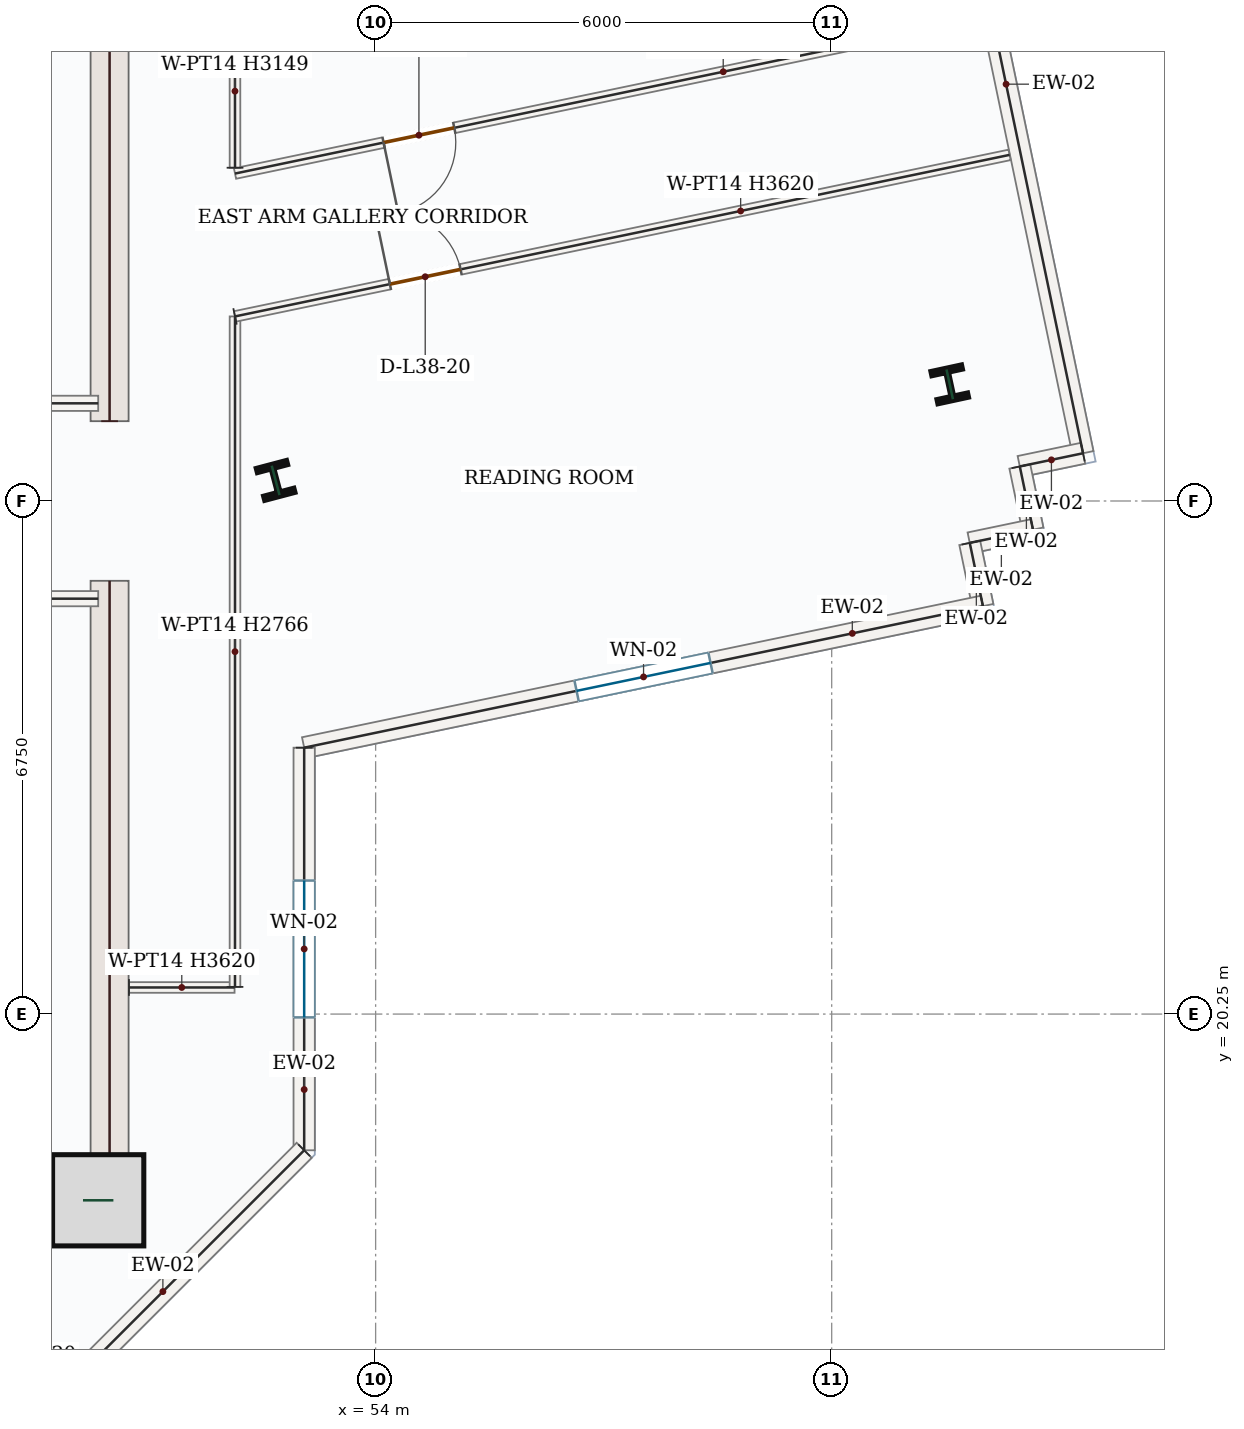
"""IFC4 building model, lengths in metres.
Left out: names, types, materials, properties, quantities, classifications, styles, units other than length and angle.
Written with IfcOpenShell. Run it as: python <this file> out.ifc"""

import sys

from ifc_helpers import new_model, si_unit, direction, frame, frame_2d, origin, origin_2d, place, context, subcontext, project, spatial, rectangle, i_section, extrude, source, transform, mapped, element, fill, save


model = new_model("IFC4")
c1 = context("Model", 3, precision=1e-05, world=origin(), true_north=direction((0.0, 1.0)))
c2 = subcontext(c1, "Body", "Model", "MODEL_VIEW")
j1 = project(units=[si_unit("LENGTHUNIT", "METRE"), si_unit("PLANEANGLEUNIT", "RADIAN")], contexts=[c1])
p1 = place(None, origin())
s1 = spatial("IfcSite", under=j1, at=p1, CompositionType="ELEMENT")
p2 = place(p1, origin())
s2 = spatial("IfcBuilding", under=s1, at=p2, CompositionType="ELEMENT")
p3 = place(p2, frame((0.0, 0.0, 166.8)))
s3 = spatial("IfcBuildingStorey", under=s2, at=p3, CompositionType="ELEMENT", Elevation=166.8)
m1 = source(origin(), c2, "Body", "SweptSolid", [
    extrude(rectangle(XDim=8.55, YDim=0.5, at=frame_2d((4.275, 0.0))), origin(), (0.0, 0.0, 1.0), 3.62),
])
for number, where, z_axis, x_axis in (
    (1, (50.5, 17.4, 0.0), (0.0, 0.0, 1.0), (0.0, 1.0, 0.0)),
    (2, (50.5, 28.05, 0.0), (0.0, 0.0, 1.0), (0.0, 1.0, 0.0)),
):
    element("IfcWall", number, at=place(p3, frame(where, z_axis=z_axis, x_axis=x_axis)), inside=s3, PredefinedType="SHEAR", context=c2, shape_type="MappedRepresentation", body=[
        mapped(m1, transform((0.0, 0.0, 0.0), x_axis=(1.0, 0.0, 0.0), y_axis=(0.0, 1.0, 0.0), z_axis=(0.0, 0.0, 1.0), scale=1.0)),
    ])
m2 = source(origin(), c2, "Body", "SweptSolid", [
    extrude(rectangle(XDim=7.0, YDim=0.5, at=frame_2d((3.5, 0.0))), origin(), (0.0, 0.0, 1.0), 3.62),
])
p4 = place(p3, frame((43.25, 17.65, 0.0), z_axis=(0.0, 0.0, 1.0), x_axis=(1.0, 0.0, 0.0)))
e3 = element("IfcWall", 3, at=p4, inside=s3, PredefinedType="SHEAR", context=c2, shape_type="MappedRepresentation", body=[
    mapped(m2, transform((0.0, 0.0, 0.0), x_axis=(1.0, 0.0, 0.0), y_axis=(0.0, 1.0, 0.0), z_axis=(0.0, 0.0, 1.0), scale=1.0)),
])
m3 = source(origin(), c2, "Body", "SweptSolid", [
    extrude(rectangle(XDim=1.2, YDim=1.2, at=origin_2d()), origin(), (0.0, 0.0, 1.0), 3.9),
])
p5 = place(p3, frame((50.35, 17.8, 0.0), z_axis=(0.0, 0.0, 1.0), x_axis=(1.0, 0.0, 0.0)))
e4 = element("IfcColumn", 4, at=p5, inside=s3, PredefinedType="COLUMN", context=c2, shape_type="MappedRepresentation", body=[
    mapped(m3, transform((0.0, 0.0, 0.0), x_axis=(1.0, 0.0, 0.0), y_axis=(0.0, 1.0, 0.0), z_axis=(0.0, 0.0, 1.0), scale=1.0)),
])
m4 = source(origin(), c2, "Body", "SweptSolid", [
    extrude(i_section(OverallWidth=0.412, OverallDepth=0.435, WebThickness=0.036, FlangeThickness=0.057, FilletRadius=0.018, at=origin_2d()), origin(), (0.0, 0.0, 1.0), 3.9),
])
for number, where, z_axis, x_axis in (
    (5, (52.684, 27.271, 0.0), (0.0, 0.0, 1.0), (0.967, 0.255, 0.0)),
    (6, (61.553, 28.535, 0.0), (0.0, 0.0, 1.0), (0.977, 0.211, 0.0)),
):
    element("IfcColumn", number, at=place(p3, frame(where, z_axis=z_axis, x_axis=x_axis)), inside=s3, PredefinedType="COLUMN", context=c2, shape_type="MappedRepresentation", body=[
        mapped(m4, transform((0.0, 0.0, 0.0), x_axis=(1.0, 0.0, 0.0), y_axis=(0.0, 1.0, 0.0), z_axis=(0.0, 0.0, 1.0), scale=1.0)),
    ])
m5 = source(origin(), c2, "Body", "SweptSolid", [
    extrude(rectangle(XDim=9.92, YDim=0.28, at=frame_2d((4.96, 0.0))), origin(), (0.0, 0.0, 1.0), 3.62),
])
p6 = place(p3, frame((61.282, 37.339, 0.0), z_axis=(0.0, 0.0, 1.0), x_axis=(0.204150812873, -0.978939449406, 0.0)))
e7 = element("IfcWall", 7, at=p6, inside=s3, PredefinedType="SOLIDWALL", context=c2, shape_type="MappedRepresentation", body=[
    mapped(m5, transform((0.0, 0.0, 0.0), x_axis=(1.0, 0.0, 0.0), y_axis=(0.0, 1.0, 0.0), z_axis=(0.0, 0.0, 1.0), scale=1.0)),
])
m6 = source(origin(), c2, "Body", "SweptSolid", [
    extrude(rectangle(XDim=0.85, YDim=0.28, at=frame_2d((0.425, 0.0))), origin(), (0.0, 0.0, 1.0), 3.62),
])
for number, where, z_axis, x_axis in (
    (8, (63.307, 27.628, 0.0), (0.0, 0.0, 1.0), (-0.979, -0.204, 0.0)),
    (9, (62.475, 27.455, 0.0), (0.0, 0.0, 1.0), (0.204, -0.979, 0.0)),
    (10, (62.648, 26.623, 0.0), (0.0, 0.0, 1.0), (-0.979, -0.204, 0.0)),
):
    element("IfcWall", number, at=place(p3, frame(where, z_axis=z_axis, x_axis=x_axis)), inside=s3, PredefinedType="SOLIDWALL", context=c2, shape_type="MappedRepresentation", body=[
        mapped(m6, transform((0.0, 0.0, 0.0), x_axis=(1.0, 0.0, 0.0), y_axis=(0.0, 1.0, 0.0), z_axis=(0.0, 0.0, 1.0), scale=1.0)),
    ])
m7 = source(origin(), c2, "Body", "SweptSolid", [
    extrude(rectangle(XDim=0.85, YDim=0.28, at=frame_2d((0.425, 0.0))), origin(), (0.0, 0.0, 1.0), 3.62),
])
p7 = place(p3, frame((61.816, 26.449, 0.0), z_axis=(0.0, 0.0, 1.0), x_axis=(0.203896913579, -0.97899236393, 0.0)))
e11 = element("IfcWall", 11, at=p7, inside=s3, PredefinedType="SOLIDWALL", context=c2, shape_type="MappedRepresentation", body=[
    mapped(m7, transform((0.0, 0.0, 0.0), x_axis=(1.0, 0.0, 0.0), y_axis=(0.0, 1.0, 0.0), z_axis=(0.0, 0.0, 1.0), scale=1.0)),
])
p8 = place(p3, frame((61.99, 25.617, 0.0), z_axis=(0.0, 0.0, 1.0), x_axis=(-0.978937646314, -0.204159458828, 0.0)))
e12 = element("IfcWall", 12, at=p8, inside=s3, PredefinedType="SOLIDWALL", context=c2, shape_type="SweptSolid", body=[
    extrude(rectangle(XDim=9.122, YDim=0.28, at=frame_2d((4.561, 0.0))), origin(), (0.0, 0.0, 1.0), 3.62),
])
p9 = place(p8, frame((3.661, 0.0, 0.85)))
e13 = element("IfcOpeningElement", 13, at=p9, cuts=e12, PredefinedType="OPENING", context=c2, shape_type="SweptSolid", body=[
    extrude(rectangle(XDim=1.8, YDim=1.75, at=frame_2d((0.9, 0.875))), frame((0.0, 0.15, 0.0), z_axis=(0.0, -1.0, 0.0), x_axis=(1.0, 0.0, 0.0)), (0.0, 0.0, 1.0), 0.3),
])
p10 = place(p3, frame((53.06, 23.754, 0.0), z_axis=(0.0, 0.0, 1.0), x_axis=(0.0, -1.0, 0.0)))
e14 = element("IfcWall", 14, at=p10, inside=s3, PredefinedType="SOLIDWALL", context=c2, shape_type="SweptSolid", body=[
    extrude(rectangle(XDim=5.296, YDim=0.28, at=frame_2d((2.648, 0.0))), origin(), (0.0, 0.0, 1.0), 3.62),
])
p11 = place(p10, frame((1.748, 0.0, 0.85)))
e15 = element("IfcOpeningElement", 15, at=p11, cuts=e14, PredefinedType="OPENING", context=c2, shape_type="SweptSolid", body=[
    extrude(rectangle(XDim=1.8, YDim=1.75, at=frame_2d((0.9, 0.875))), frame((0.0, 0.15, 0.0), z_axis=(0.0, -1.0, 0.0), x_axis=(1.0, 0.0, 0.0)), (0.0, 0.0, 1.0), 0.3),
])
m8 = source(origin(), c2, "Body", "SweptSolid", [
    extrude(rectangle(XDim=5.258, YDim=0.28, at=frame_2d((2.629, 0.0))), origin(), (0.0, 0.0, 1.0), 3.62),
])
p12 = place(p3, frame((53.06, 18.458, 0.0), z_axis=(0.0, 0.0, 1.0), x_axis=(-0.707106781187, -0.707106781187, 0.0)))
e16 = element("IfcWall", 16, at=p12, inside=s3, PredefinedType="SOLIDWALL", context=c2, shape_type="MappedRepresentation", body=[
    mapped(m8, transform((0.0, 0.0, 0.0), x_axis=(1.0, 0.0, 0.0), y_axis=(0.0, 1.0, 0.0), z_axis=(0.0, 0.0, 1.0), scale=1.0)),
])
m9 = source(origin(), c2, "Body", "SweptSolid", [
    extrude(rectangle(XDim=4.25, YDim=0.2, at=frame_2d((2.125, 0.0))), origin(), (0.0, 0.0, 1.0), 3.62),
])
for number, where, z_axis, x_axis in (
    (17, (46.1, 25.715, 0.0), (0.0, 0.0, 1.0), (1.0, 0.0, 0.0)),
    (18, (46.1, 28.285, 0.0), (0.0, 0.0, 1.0), (1.0, 0.0, 0.0)),
):
    element("IfcWall", number, at=place(p3, frame(where, z_axis=z_axis, x_axis=x_axis)), inside=s3, PredefinedType="SOLIDWALL", context=c2, shape_type="MappedRepresentation", body=[
        mapped(m9, transform((0.0, 0.0, 0.0), x_axis=(1.0, 0.0, 0.0), y_axis=(0.0, 1.0, 0.0), z_axis=(0.0, 0.0, 1.0), scale=1.0)),
    ])
m10 = source(origin(), c2, "Body", "SweptSolid", [
    extrude(rectangle(XDim=1.389, YDim=0.14, at=frame_2d((0.695, 0.0))), origin(), (0.0, 0.0, 1.0), 3.62),
])
p13 = place(p3, frame((50.755, 20.6, 0.0), z_axis=(0.0, 0.0, 1.0), x_axis=(1.0, 0.0, 0.0)))
e19 = element("IfcWall", 19, at=p13, inside=s3, PredefinedType="PARTITIONING", context=c2, shape_type="MappedRepresentation", body=[
    mapped(m10, transform((0.0, 0.0, 0.0), x_axis=(1.0, 0.0, 0.0), y_axis=(0.0, 1.0, 0.0), z_axis=(0.0, 0.0, 1.0), scale=1.0)),
])
m11 = source(origin(), c2, "Body", "SweptSolid", [
    extrude(rectangle(XDim=8.821, YDim=0.14, at=frame_2d((4.41, 0.0))), origin(), (0.0, 0.0, 1.0), 2.766),
])
p14 = place(p3, frame((52.15, 20.608, 0.0), z_axis=(0.0, 0.0, 1.0), x_axis=(2.7678596e-05, 0.999999999617, 0.0)))
e20 = element("IfcWall", 20, at=p14, inside=s3, PredefinedType="PARTITIONING", context=c2, shape_type="MappedRepresentation", body=[
    mapped(m11, transform((0.0, 0.0, 0.0), x_axis=(1.0, 0.0, 0.0), y_axis=(0.0, 1.0, 0.0), z_axis=(0.0, 0.0, 1.0), scale=1.0)),
])
p15 = place(p3, frame((52.15, 29.428, 0.0), z_axis=(0.0, 0.0, 1.0), x_axis=(0.978935516763, 0.204169669688, 0.0)))
e21 = element("IfcWall", 21, at=p15, inside=s3, PredefinedType="PARTITIONING", context=c2, shape_type="SweptSolid", body=[
    extrude(rectangle(XDim=10.409, YDim=0.14, at=frame_2d((5.205, 0.0))), origin(), (0.0, 0.0, 1.0), 3.62),
])
p16 = place(p15, frame((2.081, 0.0, 0.0)))
e22 = element("IfcOpeningElement", 22, at=p16, cuts=e21, PredefinedType="OPENING", context=c2, shape_type="SweptSolid", body=[
    extrude(rectangle(XDim=0.95, YDim=2.15, at=frame_2d((0.475, 1.075))), frame((0.0, 0.08, 0.0), z_axis=(0.0, -1.0, 0.0), x_axis=(1.0, 0.0, 0.0)), (0.0, 0.0, 1.0), 0.16),
])
p17 = place(p3, frame((61.965, 33.354, 0.0), z_axis=(0.0, 0.0, 1.0), x_axis=(-0.978942518705, -0.204136094483, 0.0)))
e23 = element("IfcWall", 23, at=p17, inside=s3, PredefinedType="PARTITIONING", context=c2, shape_type="SweptSolid", body=[
    extrude(rectangle(XDim=10.026, YDim=0.14, at=frame_2d((5.013, 0.0))), origin(), (0.0, 0.0, 1.0), 3.62),
])
p18 = place(p17, frame((7.079, 0.0, 0.0)))
e24 = element("IfcOpeningElement", 24, at=p18, cuts=e23, PredefinedType="OPENING", context=c2, shape_type="SweptSolid", body=[
    extrude(rectangle(XDim=0.95, YDim=2.15, at=frame_2d((0.475, 1.075))), frame((0.0, 0.08, 0.0), z_axis=(0.0, -1.0, 0.0), x_axis=(1.0, 0.0, 0.0)), (0.0, 0.0, 1.0), 0.16),
])
m12 = source(origin(), c2, "Body", "SweptSolid", [
    extrude(rectangle(XDim=2.014, YDim=0.14, at=frame_2d((1.007, 0.0))), origin(), (0.0, 0.0, 1.0), 3.149),
])
p19 = place(p3, frame((52.15, 31.385, 0.0), z_axis=(0.0, 0.0, 1.0), x_axis=(-0.000484789665, 0.999999882489, 0.0)))
e25 = element("IfcWall", 25, at=p19, inside=s3, PredefinedType="PARTITIONING", context=c2, shape_type="MappedRepresentation", body=[
    mapped(m12, transform((0.0, 0.0, 0.0), x_axis=(1.0, 0.0, 0.0), y_axis=(0.0, 1.0, 0.0), z_axis=(0.0, 0.0, 1.0), scale=1.0)),
])
m13 = source(origin(), c2, "Body", "SweptSolid", [
    extrude(rectangle(XDim=1.8, YDim=1.75, at=frame_2d((0.9, 0.875))), frame((0.0, 0.03, 0.0), z_axis=(0.0, -1.0, 0.0), x_axis=(1.0, 0.0, 0.0)), (0.0, 0.0, 1.0), 0.06),
])
p20 = place(p9, origin())
e26 = element("IfcWindow", 26, at=p20, inside=s3, PartitioningType="DOUBLE_PANEL_VERTICAL", PredefinedType="WINDOW", context=c2, shape_type="MappedRepresentation", body=[
    mapped(m13, transform((0.0, 0.0, 0.0), x_axis=(1.0, 0.0, 0.0), y_axis=(0.0, 1.0, 0.0), z_axis=(0.0, 0.0, 1.0), scale=1.0)),
])
fill(e13, e26)
p21 = place(p11, origin())
e27 = element("IfcWindow", 27, at=p21, inside=s3, PartitioningType="DOUBLE_PANEL_VERTICAL", PredefinedType="WINDOW", context=c2, shape_type="MappedRepresentation", body=[
    mapped(m13, transform((0.0, 0.0, 0.0), x_axis=(1.0, 0.0, 0.0), y_axis=(0.0, 1.0, 0.0), z_axis=(0.0, 0.0, 1.0), scale=1.0)),
])
fill(e15, e27)
m14 = source(origin(), c2, "Body", "SweptSolid", [
    extrude(rectangle(XDim=0.95, YDim=2.15, at=frame_2d((0.475, 1.075))), frame((0.0, 0.025, 0.0), z_axis=(0.0, -1.0, 0.0), x_axis=(1.0, 0.0, 0.0)), (0.0, 0.0, 1.0), 0.05),
])
p22 = place(p16, origin())
e28 = element("IfcDoor", 28, at=p22, inside=s3, OperationType="SINGLE_SWING_LEFT", PredefinedType="DOOR", context=c2, shape_type="MappedRepresentation", body=[
    mapped(m14, transform((0.0, 0.0, 0.0), x_axis=(1.0, 0.0, 0.0), y_axis=(0.0, 1.0, 0.0), z_axis=(0.0, 0.0, 1.0), scale=1.0)),
])
fill(e22, e28)
p23 = place(p18, origin())
e29 = element("IfcDoor", 29, at=p23, inside=s3, OperationType="SINGLE_SWING_RIGHT", PredefinedType="DOOR", context=c2, shape_type="MappedRepresentation", body=[
    mapped(m14, transform((0.0, 0.0, 0.0), x_axis=(1.0, 0.0, 0.0), y_axis=(0.0, 1.0, 0.0), z_axis=(0.0, 0.0, 1.0), scale=1.0)),
])
fill(e24, e29)
save(model, sys.argv[1])
